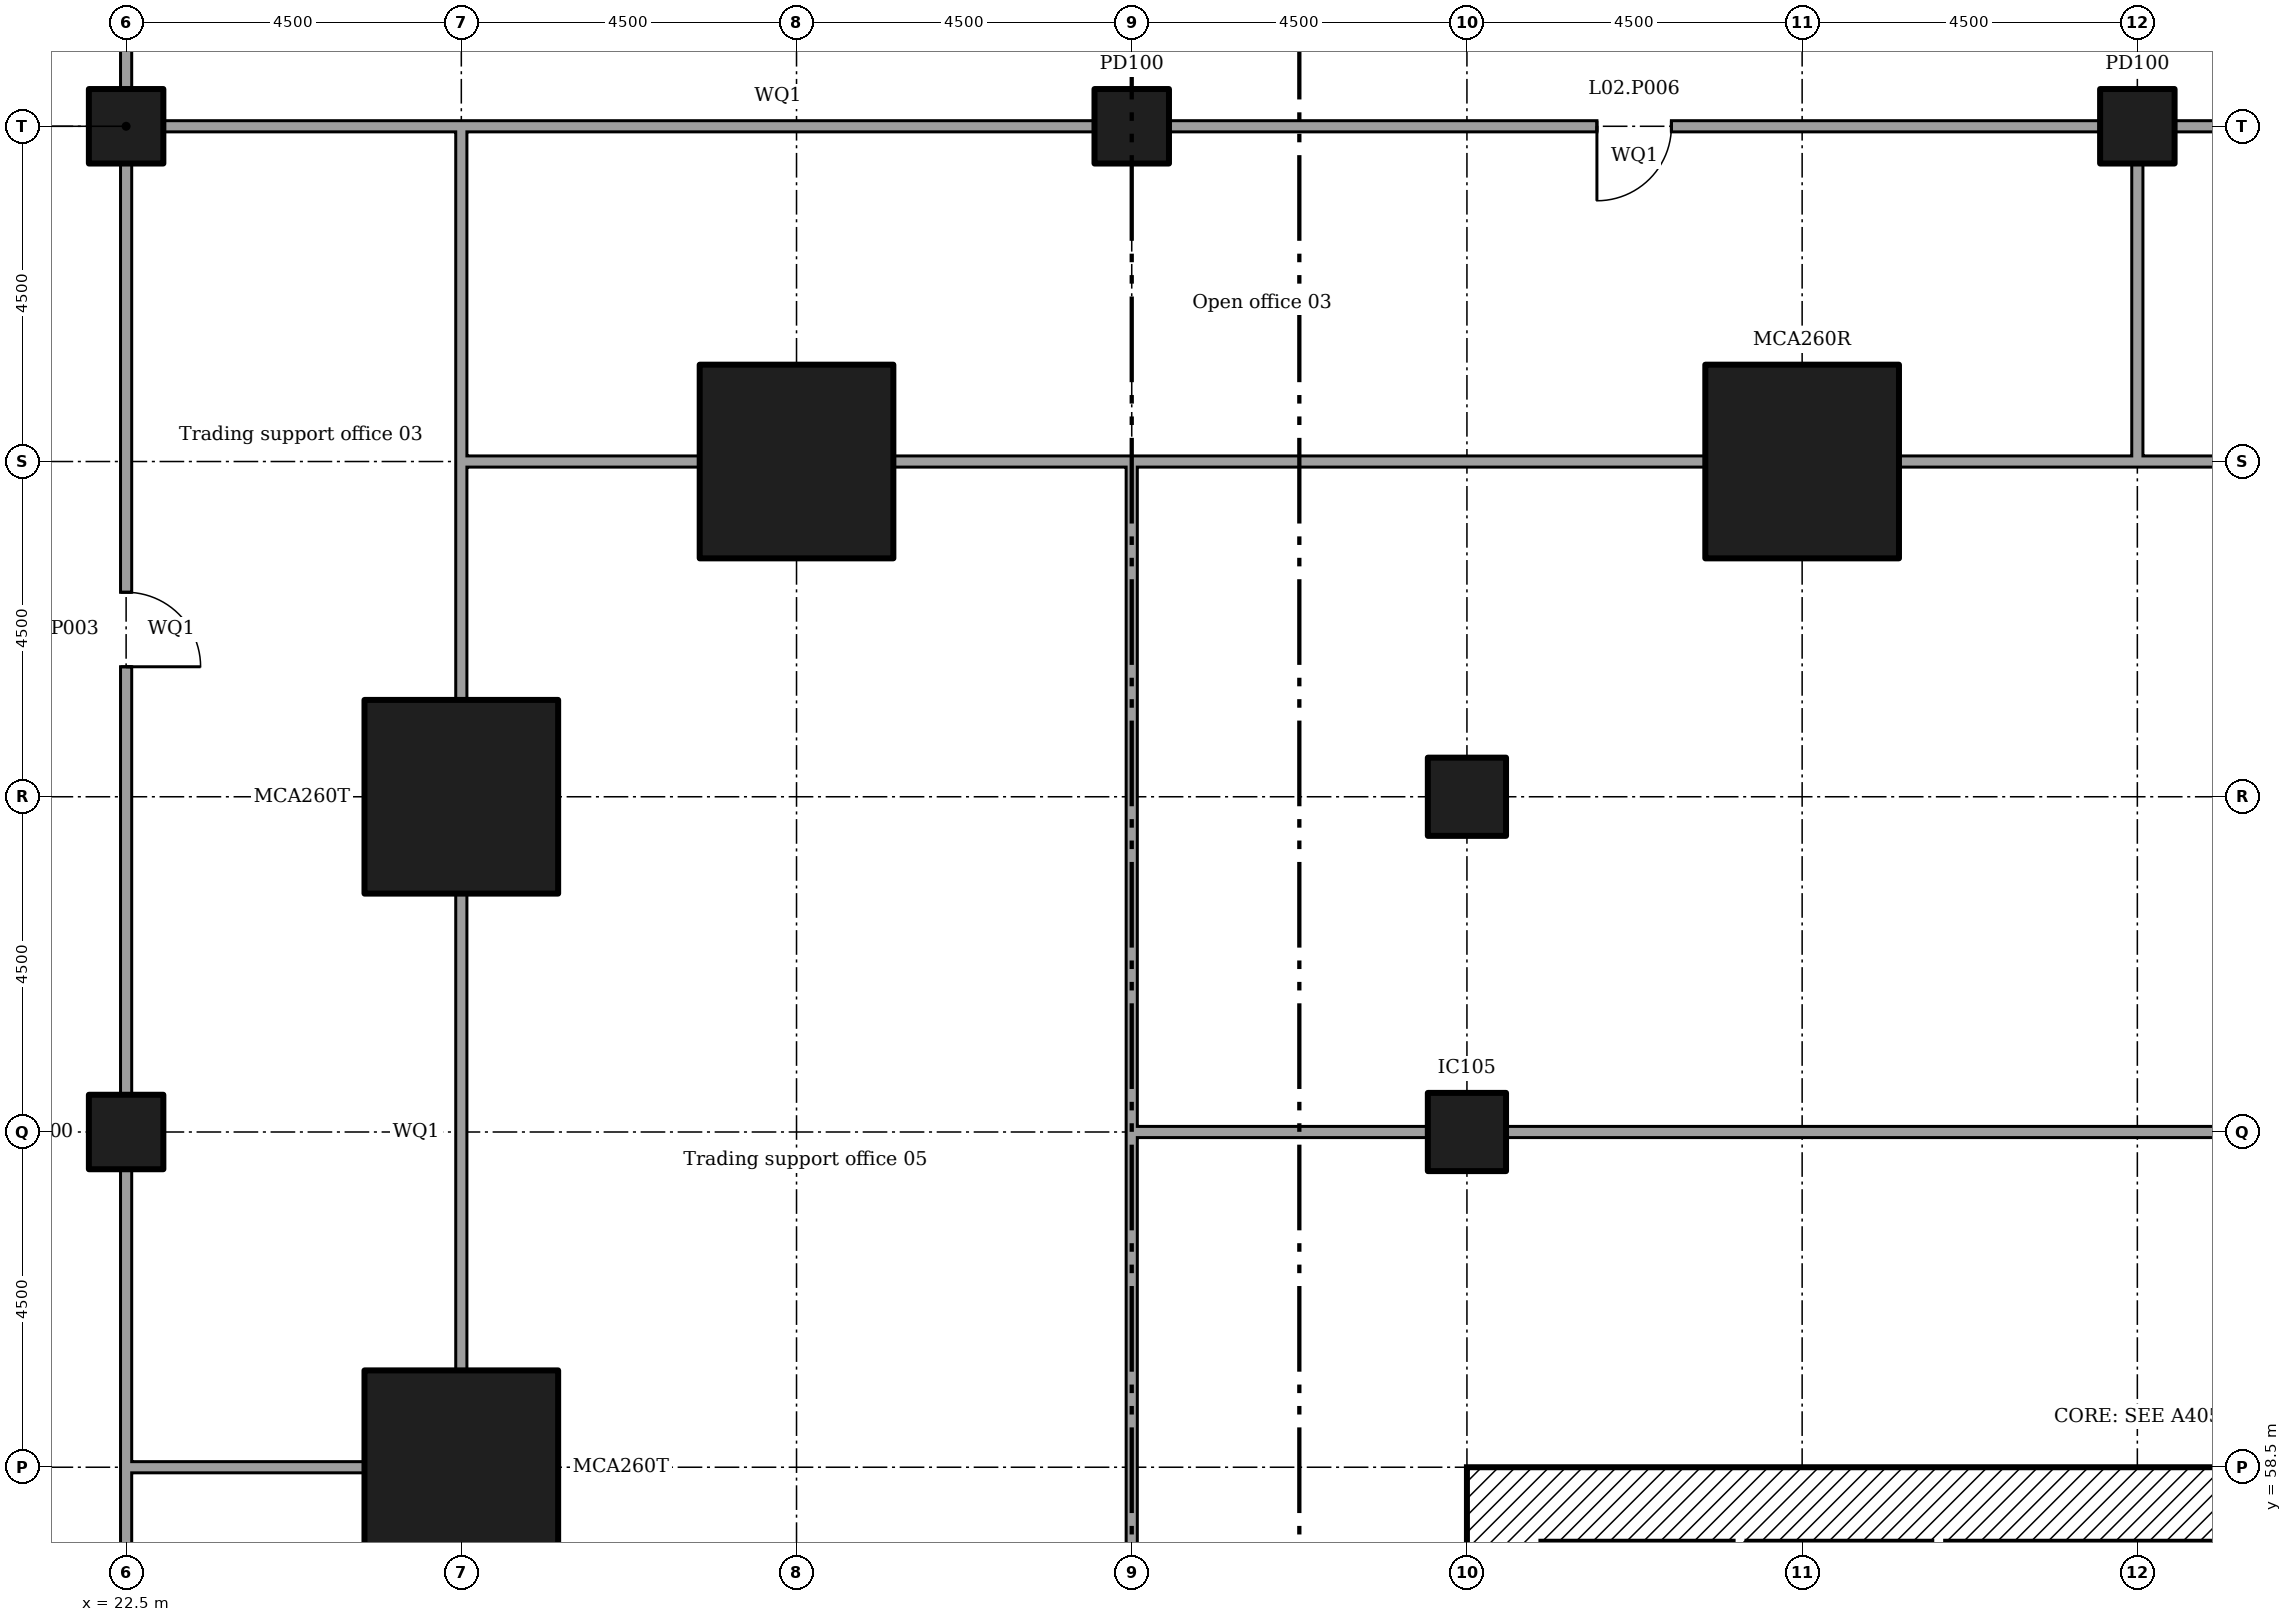
"""IFC4 building model, lengths in metres.
Left out: names, types, materials, properties, quantities, classifications, styles, units other than length and angle.
Written with IfcOpenShell. Run it as: python <this file> out.ifc"""

import sys

from ifc_helpers import new_model, si_unit, direction, frame, frame_2d, origin, origin_2d, place, context, subcontext, project, spatial, rectangle, extrude, element, fill, save


model = new_model("IFC4")
c1 = context("Model", 3, precision=1e-05, world=origin(), true_north=direction((0.0, 1.0)))
c2 = subcontext(c1, "Body", "Model", "MODEL_VIEW")
j1 = project(units=[si_unit("LENGTHUNIT", "METRE"), si_unit("PLANEANGLEUNIT", "RADIAN")], contexts=[c1])
p1 = place(None, origin())
s1 = spatial("IfcSite", under=j1, at=p1, CompositionType="ELEMENT")
p2 = place(p1, origin())
s2 = spatial("IfcBuilding", under=s1, at=p2, CompositionType="ELEMENT")
p3 = place(p2, frame((0.0, 0.0, 11.5)))
s3 = spatial("IfcBuildingStorey", under=s2, at=p3, CompositionType="ELEMENT", Elevation=11.5)
for number, where in (
    (1, (27.0, 58.5, 0.0)),
    (2, (27.0, 67.5, 0.0)),
    (3, (31.5, 72.0, 0.0)),
    (4, (45.0, 72.0, 0.0)),
):
    element("IfcColumn", number, at=place(p3, frame(where)), inside=s3, PredefinedType="COLUMN", context=c2, shape_type="SweptSolid", body=[
        extrude(rectangle(XDim=2.6, YDim=2.6, at=origin_2d()), origin(), (0.0, 0.0, 1.0), 5.0),
    ])
for number, where in (
    (5, (40.5, 63.0, 0.0)),
    (6, (40.5, 67.5, 0.0)),
):
    element("IfcColumn", number, at=place(p3, frame(where)), inside=s3, PredefinedType="COLUMN", context=c2, shape_type="SweptSolid", body=[
        extrude(rectangle(XDim=1.05, YDim=1.05, at=origin_2d()), origin(), (0.0, 0.0, 1.0), 5.0),
    ])
for number, where in (
    (7, (22.5, 63.0, 0.0)),
    (8, (22.5, 76.5, 0.0)),
    (9, (36.0, 76.5, 0.0)),
    (10, (49.5, 76.5, 0.0)),
):
    element("IfcColumn", number, at=place(p3, frame(where)), inside=s3, PredefinedType="COLUMN", context=c2, shape_type="SweptSolid", body=[
        extrude(rectangle(XDim=1.0, YDim=1.0, at=origin_2d()), origin(), (0.0, 0.0, 1.0), 5.0),
    ])
p4 = place(p3, frame((41.5, 58.0, 0.0)))
e11 = element("IfcWall", 11, at=p4, inside=s3, PredefinedType="SHEAR", context=c2, shape_type="SweptSolid", body=[
    extrude(rectangle(XDim=16.0, YDim=1.0, at=frame_2d((8.0, 0.0))), origin(), (0.0, 0.0, 1.0), 4.5),
])
p5 = place(p3, frame((41.0, 40.5, 0.0), z_axis=(0.0, 0.0, 1.0), x_axis=(0.0, 1.0, 0.0)))
e12 = element("IfcWall", 12, at=p5, inside=s3, PredefinedType="SHEAR", context=c2, shape_type="SweptSolid", body=[
    extrude(rectangle(XDim=18.0, YDim=1.0, at=frame_2d((9.0, 0.0))), origin(), (0.0, 0.0, 1.0), 4.5),
])
p6 = place(p5, frame((3.65, 0.0, 0.0)))
e13 = element("IfcOpeningElement", 13, at=p6, cuts=e12, PredefinedType="OPENING", context=c2, shape_type="SweptSolid", body=[
    extrude(rectangle(XDim=1.2, YDim=2.1, at=frame_2d((0.6, 1.05))), frame((0.0, 0.51, 0.0), z_axis=(0.0, -1.0, 0.0), x_axis=(1.0, 0.0, 0.0)), (0.0, 0.0, 1.0), 1.02),
])
p7 = place(p5, frame((5.475, 0.0, 0.0)))
e14 = element("IfcOpeningElement", 14, at=p7, cuts=e12, PredefinedType="OPENING", context=c2, shape_type="SweptSolid", body=[
    extrude(rectangle(XDim=1.0, YDim=2.1, at=frame_2d((0.5, 1.05))), frame((0.0, 0.51, 0.0), z_axis=(0.0, -1.0, 0.0), x_axis=(1.0, 0.0, 0.0)), (0.0, 0.0, 1.0), 1.02),
])
p8 = place(p5, frame((12.3, 0.0, 0.0)))
e15 = element("IfcOpeningElement", 15, at=p8, cuts=e12, PredefinedType="OPENING", context=c2, shape_type="SweptSolid", body=[
    extrude(rectangle(XDim=1.0, YDim=2.1, at=frame_2d((0.5, 1.05))), frame((0.0, 0.51, 0.0), z_axis=(0.0, -1.0, 0.0), x_axis=(1.0, 0.0, 0.0)), (0.0, 0.0, 1.0), 1.02),
])
p9 = place(p3, frame((22.5, 76.995, 0.0), z_axis=(0.0, 0.0, 1.0), x_axis=(0.0, 1.0, 0.0)))
e16 = element("IfcWall", 16, at=p9, inside=s3, PredefinedType="PARTITIONING", context=c2, shape_type="SweptSolid", body=[
    extrude(rectangle(XDim=3.705, YDim=0.15, at=frame_2d((1.853, 0.0))), origin(), (0.0, 0.0, 1.0), 4.55),
])
p10 = place(p9, frame((1.25, 0.0, 0.0)))
e17 = element("IfcOpeningElement", 17, at=p10, cuts=e16, PredefinedType="OPENING", context=c2, shape_type="SweptSolid", body=[
    extrude(rectangle(XDim=1.2, YDim=2.1, at=frame_2d((0.6, 1.05))), frame((0.0, 0.085, 0.0), z_axis=(0.0, -1.0, 0.0), x_axis=(1.0, 0.0, 0.0)), (0.0, 0.0, 1.0), 0.17),
])
p11 = place(p3, frame((22.5, 49.995, 0.0), z_axis=(0.0, 0.0, 1.0), x_axis=(0.0, 1.0, 0.0)))
e18 = element("IfcWall", 18, at=p11, inside=s3, PredefinedType="PARTITIONING", context=c2, shape_type="SweptSolid", body=[
    extrude(rectangle(XDim=8.58, YDim=0.15, at=frame_2d((4.29, 0.0))), origin(), (0.0, 0.0, 1.0), 4.55),
])
p12 = place(p3, frame((22.5, 58.5, 0.0), z_axis=(0.0, 0.0, 1.0), x_axis=(0.0, 1.0, 0.0)))
e19 = element("IfcWall", 19, at=p12, inside=s3, PredefinedType="PARTITIONING", context=c2, shape_type="SweptSolid", body=[
    extrude(rectangle(XDim=4.005, YDim=0.15, at=frame_2d((2.002, 0.0))), origin(), (0.0, 0.0, 1.0), 4.55),
])
p13 = place(p3, frame((22.5, 63.495, 0.0), z_axis=(0.0, 0.0, 1.0), x_axis=(0.0, 1.0, 0.0)))
e20 = element("IfcWall", 20, at=p13, inside=s3, PredefinedType="PARTITIONING", context=c2, shape_type="SweptSolid", body=[
    extrude(rectangle(XDim=12.51, YDim=0.15, at=frame_2d((6.255, 0.0))), origin(), (0.0, 0.0, 1.0), 4.55),
])
p14 = place(p13, frame((5.75, 0.0, 0.0)))
e21 = element("IfcOpeningElement", 21, at=p14, cuts=e20, PredefinedType="OPENING", context=c2, shape_type="SweptSolid", body=[
    extrude(rectangle(XDim=1.0, YDim=2.1, at=frame_2d((0.5, 1.05))), frame((0.0, 0.085, 0.0), z_axis=(0.0, -1.0, 0.0), x_axis=(1.0, 0.0, 0.0)), (0.0, 0.0, 1.0), 0.17),
])
p15 = place(p3, frame((22.995, 76.5, 0.0)))
e22 = element("IfcWall", 22, at=p15, inside=s3, PredefinedType="PARTITIONING", context=c2, shape_type="SweptSolid", body=[
    extrude(rectangle(XDim=4.08, YDim=0.15, at=frame_2d((2.04, 0.0))), origin(), (0.0, 0.0, 1.0), 4.55),
])
p16 = place(p3, frame((27.0, 76.5, 0.0)))
e23 = element("IfcWall", 23, at=p16, inside=s3, PredefinedType="PARTITIONING", context=c2, shape_type="SweptSolid", body=[
    extrude(rectangle(XDim=8.505, YDim=0.15, at=frame_2d((4.252, 0.0))), origin(), (0.0, 0.0, 1.0), 4.55),
])
p17 = place(p3, frame((36.495, 76.5, 0.0)))
e24 = element("IfcWall", 24, at=p17, inside=s3, PredefinedType="PARTITIONING", context=c2, shape_type="SweptSolid", body=[
    extrude(rectangle(XDim=12.51, YDim=0.15, at=frame_2d((6.255, 0.0))), origin(), (0.0, 0.0, 1.0), 4.55),
])
p18 = place(p17, frame((5.75, 0.0, 0.0)))
e25 = element("IfcOpeningElement", 25, at=p18, cuts=e24, PredefinedType="OPENING", context=c2, shape_type="SweptSolid", body=[
    extrude(rectangle(XDim=1.0, YDim=2.1, at=frame_2d((0.5, 1.05))), frame((0.0, 0.085, 0.0), z_axis=(0.0, -1.0, 0.0), x_axis=(1.0, 0.0, 0.0)), (0.0, 0.0, 1.0), 0.17),
])
p19 = place(p3, frame((49.995, 76.5, 0.0)))
e26 = element("IfcWall", 26, at=p19, inside=s3, PredefinedType="PARTITIONING", context=c2, shape_type="SweptSolid", body=[
    extrude(rectangle(XDim=12.51, YDim=0.15, at=frame_2d((6.255, 0.0))), origin(), (0.0, 0.0, 1.0), 4.55),
])
p20 = place(p19, frame((5.75, 0.0, 0.0)))
e27 = element("IfcOpeningElement", 27, at=p20, cuts=e26, PredefinedType="OPENING", context=c2, shape_type="SweptSolid", body=[
    extrude(rectangle(XDim=1.0, YDim=2.1, at=frame_2d((0.5, 1.05))), frame((0.0, 0.085, 0.0), z_axis=(0.0, -1.0, 0.0), x_axis=(1.0, 0.0, 0.0)), (0.0, 0.0, 1.0), 0.17),
])
p21 = place(p3, frame((22.575, 58.5, 0.0)))
e28 = element("IfcWall", 28, at=p21, inside=s3, PredefinedType="PARTITIONING", context=c2, shape_type="SweptSolid", body=[
    extrude(rectangle(XDim=3.13, YDim=0.15, at=frame_2d((1.565, 0.0))), origin(), (0.0, 0.0, 1.0), 4.55),
])
p22 = place(p3, frame((27.0, 71.925, 0.0), z_axis=(0.0, 0.0, 1.0), x_axis=(0.0, 1.0, 0.0)))
e29 = element("IfcWall", 29, at=p22, inside=s3, PredefinedType="PARTITIONING", context=c2, shape_type="SweptSolid", body=[
    extrude(rectangle(XDim=4.5, YDim=0.15, at=frame_2d((2.25, 0.0))), origin(), (0.0, 0.0, 1.0), 4.55),
])
p23 = place(p3, frame((27.0, 59.795, 0.0), z_axis=(0.0, 0.0, 1.0), x_axis=(0.0, 1.0, 0.0)))
e30 = element("IfcWall", 30, at=p23, inside=s3, PredefinedType="PARTITIONING", context=c2, shape_type="SweptSolid", body=[
    extrude(rectangle(XDim=6.41, YDim=0.15, at=frame_2d((3.205, 0.0))), origin(), (0.0, 0.0, 1.0), 4.55),
])
p24 = place(p3, frame((27.0, 68.795, 0.0), z_axis=(0.0, 0.0, 1.0), x_axis=(0.0, 1.0, 0.0)))
e31 = element("IfcWall", 31, at=p24, inside=s3, PredefinedType="PARTITIONING", context=c2, shape_type="SweptSolid", body=[
    extrude(rectangle(XDim=3.205, YDim=0.15, at=frame_2d((1.603, 0.0))), origin(), (0.0, 0.0, 1.0), 4.55),
])
p25 = place(p3, frame((49.5, 71.925, 0.0), z_axis=(0.0, 0.0, 1.0), x_axis=(0.0, 1.0, 0.0)))
e32 = element("IfcWall", 32, at=p25, inside=s3, PredefinedType="PARTITIONING", context=c2, shape_type="SweptSolid", body=[
    extrude(rectangle(XDim=4.08, YDim=0.15, at=frame_2d((2.04, 0.0))), origin(), (0.0, 0.0, 1.0), 4.55),
])
p26 = place(p3, frame((35.925, 72.0, 0.0)))
e33 = element("IfcWall", 33, at=p26, inside=s3, PredefinedType="PARTITIONING", context=c2, shape_type="SweptSolid", body=[
    extrude(rectangle(XDim=7.78, YDim=0.15, at=frame_2d((3.89, 0.0))), origin(), (0.0, 0.0, 1.0), 4.55),
])
for number, where in (
    (34, (46.295, 72.0, 0.0)),
    (35, (27.075, 72.0, 0.0)),
):
    element("IfcWall", number, at=place(p3, frame(where)), inside=s3, PredefinedType="PARTITIONING", context=c2, shape_type="SweptSolid", body=[
        extrude(rectangle(XDim=3.13, YDim=0.15, at=frame_2d((1.565, 0.0))), origin(), (0.0, 0.0, 1.0), 4.55),
    ])
p27 = place(p3, frame((32.795, 72.0, 0.0)))
e36 = element("IfcWall", 36, at=p27, inside=s3, PredefinedType="PARTITIONING", context=c2, shape_type="SweptSolid", body=[
    extrude(rectangle(XDim=3.205, YDim=0.15, at=frame_2d((1.603, 0.0))), origin(), (0.0, 0.0, 1.0), 4.55),
])
p28 = place(p3, frame((49.5, 72.0, 0.0)))
e37 = element("IfcWall", 37, at=p28, inside=s3, PredefinedType="PARTITIONING", context=c2, shape_type="SweptSolid", body=[
    extrude(rectangle(XDim=7.705, YDim=0.15, at=frame_2d((3.853, 0.0))), origin(), (0.0, 0.0, 1.0), 4.55),
])
p29 = place(p3, frame((36.0, 62.925, 0.0), z_axis=(0.0, 0.0, 1.0), x_axis=(0.0, 1.0, 0.0)))
e38 = element("IfcWall", 38, at=p29, inside=s3, PredefinedType="PARTITIONING", context=c2, shape_type="SweptSolid", body=[
    extrude(rectangle(XDim=9.0, YDim=0.15, at=frame_2d((4.5, 0.0))), origin(), (0.0, 0.0, 1.0), 4.55),
])
p30 = place(p3, frame((36.075, 63.0, 0.0)))
e39 = element("IfcWall", 39, at=p30, inside=s3, PredefinedType="PARTITIONING", context=c2, shape_type="SweptSolid", body=[
    extrude(rectangle(XDim=3.905, YDim=0.15, at=frame_2d((1.953, 0.0))), origin(), (0.0, 0.0, 1.0), 4.55),
])
p31 = place(p3, frame((41.02, 63.0, 0.0)))
e40 = element("IfcWall", 40, at=p31, inside=s3, PredefinedType="PARTITIONING", context=c2, shape_type="SweptSolid", body=[
    extrude(rectangle(XDim=21.905, YDim=0.15, at=frame_2d((10.953, 0.0))), origin(), (0.0, 0.0, 1.0), 4.55),
])
p32 = place(p31, frame((10.5, 0.0, 0.0)))
e41 = element("IfcOpeningElement", 41, at=p32, cuts=e40, PredefinedType="OPENING", context=c2, shape_type="SweptSolid", body=[
    extrude(rectangle(XDim=1.0, YDim=2.1, at=frame_2d((0.5, 1.05))), frame((0.0, 0.085, 0.0), z_axis=(0.0, -1.0, 0.0), x_axis=(1.0, 0.0, 0.0)), (0.0, 0.0, 1.0), 0.17),
])
p33 = place(p3, frame((36.0, 49.5, 0.0), z_axis=(0.0, 0.0, 1.0), x_axis=(0.0, 1.0, 0.0)))
e42 = element("IfcWall", 42, at=p33, inside=s3, PredefinedType="PARTITIONING", context=c2, shape_type="SweptSolid", body=[
    extrude(rectangle(XDim=13.5, YDim=0.15, at=frame_2d((6.75, 0.0))), origin(), (0.0, 0.0, 1.0), 4.55),
])
p34 = place(p33, frame((6.25, 0.0, 0.0)))
e43 = element("IfcOpeningElement", 43, at=p34, cuts=e42, PredefinedType="OPENING", context=c2, shape_type="SweptSolid", body=[
    extrude(rectangle(XDim=1.0, YDim=2.1, at=frame_2d((0.5, 1.05))), frame((0.0, 0.085, 0.0), z_axis=(0.0, -1.0, 0.0), x_axis=(1.0, 0.0, 0.0)), (0.0, 0.0, 1.0), 0.17),
])
p35 = place(p14, frame((1.0, 0.0, 0.0), x_axis=(-1.0, 0.0, 0.0)))
e44 = element("IfcDoor", 44, at=p35, inside=s3, OperationType="SINGLE_SWING_LEFT", PredefinedType="DOOR", context=c2, shape_type="SweptSolid", body=[
    extrude(rectangle(XDim=1.0, YDim=2.1, at=frame_2d((0.5, 1.05))), frame((0.0, 0.025, 0.0), z_axis=(0.0, -1.0, 0.0), x_axis=(1.0, 0.0, 0.0)), (0.0, 0.0, 1.0), 0.05),
])
fill(e21, e44)
p36 = place(p18, frame((1.0, 0.0, 0.0), x_axis=(-1.0, 0.0, 0.0)))
e45 = element("IfcDoor", 45, at=p36, inside=s3, OperationType="SINGLE_SWING_LEFT", PredefinedType="DOOR", context=c2, shape_type="SweptSolid", body=[
    extrude(rectangle(XDim=1.0, YDim=2.1, at=frame_2d((0.5, 1.05))), frame((0.0, 0.025, 0.0), z_axis=(0.0, -1.0, 0.0), x_axis=(1.0, 0.0, 0.0)), (0.0, 0.0, 1.0), 0.05),
])
fill(e25, e45)
save(model, sys.argv[1])
